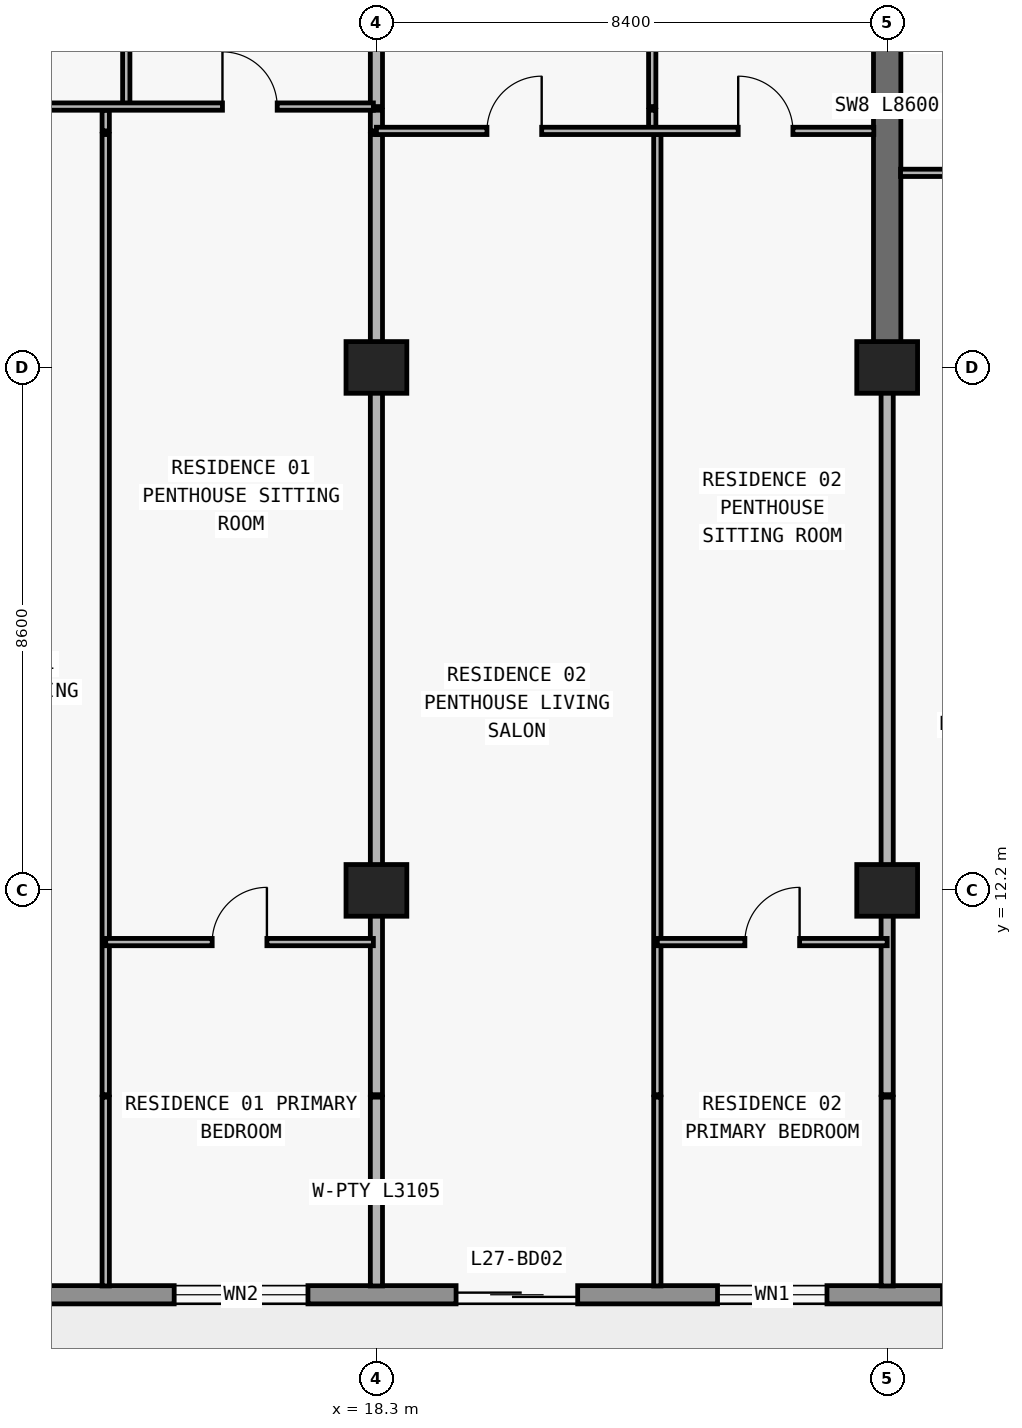
"""IFC4 building model, lengths in metres.
Left out: names, types, materials, properties, quantities, classifications, styles, units other than length and angle.
Written with IfcOpenShell. Run it as: python <this file> out.ifc"""

import sys

from ifc_helpers import new_model, si_unit, direction, frame, frame_2d, origin, origin_2d, place, context, subcontext, project, spatial, rectangle, extrude, element, fill, save


model = new_model("IFC4")
c1 = context("Model", 3, precision=1e-05, world=origin(), true_north=direction((0.0, 1.0)))
c2 = subcontext(c1, "Body", "Model", "MODEL_VIEW")
j1 = project(units=[si_unit("LENGTHUNIT", "METRE"), si_unit("PLANEANGLEUNIT", "RADIAN")], contexts=[c1])
p1 = place(None, origin())
s1 = spatial("IfcSite", under=j1, at=p1, CompositionType="ELEMENT")
p2 = place(p1, origin())
s2 = spatial("IfcBuilding", under=s1, at=p2, CompositionType="ELEMENT")
p3 = place(p2, frame((0.0, 0.0, 102.6)))
s3 = spatial("IfcBuildingStorey", under=s2, at=p3, CompositionType="ELEMENT", Elevation=102.6)
for number, where, z_axis, x_axis in (
    (1, (18.3, 12.2, 0.0), (0.0, 0.0, 1.0), (1.0, 0.0, 0.0)),
    (2, (26.7, 12.2, 0.0), (0.0, 0.0, 1.0), (1.0, 0.0, 0.0)),
    (3, (18.3, 20.8, 0.0), (0.0, 0.0, 1.0), (1.0, 0.0, 0.0)),
    (4, (26.7, 20.8, 0.0), (0.0, 0.0, 1.0), (1.0, 0.0, 0.0)),
):
    element("IfcColumn", number, at=place(p3, frame(where, z_axis=z_axis, x_axis=x_axis)), inside=s3, PredefinedType="COLUMN", context=c2, shape_type="SweptSolid", body=[
        extrude(rectangle(XDim=1.0, YDim=0.85, at=origin_2d()), origin(), (0.0, 0.0, 1.0), 3.05),
    ])
p4 = place(p3, frame((26.7, 20.8, 0.0), z_axis=(0.0, 0.0, 1.0), x_axis=(0.0, 1.0, 0.0)))
e5 = element("IfcWall", 5, at=p4, inside=s3, PredefinedType="SHEAR", context=c2, shape_type="SweptSolid", body=[
    extrude(rectangle(XDim=8.6, YDim=0.45, at=frame_2d((4.3, 0.0))), origin(), (0.0, 0.0, 1.0), 3.05),
])
p5 = place(p3, frame((70.1, 5.55, 0.0), z_axis=(0.0, 0.0, 1.0), x_axis=(-1.0, 0.0, 0.0)))
e6 = element("IfcWall", 6, at=p5, inside=s3, PredefinedType="STANDARD", context=c2, shape_type="SweptSolid", body=[
    extrude(rectangle(XDim=62.4, YDim=0.3, at=frame_2d((31.2, 0.0))), origin(), (0.0, 0.0, 1.0), 3.05),
])
p6 = place(p5, frame((57.226, 0.0, 0.0)))
e7 = element("IfcOpeningElement", 7, at=p6, cuts=e6, PredefinedType="OPENING", context=c2, shape_type="SweptSolid", body=[
    extrude(rectangle(XDim=2.0, YDim=2.3, at=frame_2d((1.0, 1.15))), frame((0.0, 0.16, 0.0), z_axis=(0.0, -1.0, 0.0), x_axis=(1.0, 0.0, 0.0)), (0.0, 0.0, 1.0), 0.32),
])
p7 = place(p5, frame((52.926, 0.0, 0.85)))
e8 = element("IfcOpeningElement", 8, at=p7, cuts=e6, PredefinedType="OPENING", context=c2, shape_type="SweptSolid", body=[
    extrude(rectangle(XDim=2.2, YDim=1.55, at=frame_2d((1.1, 0.775))), frame((0.0, 0.16, 0.0), z_axis=(0.0, -1.0, 0.0), x_axis=(1.0, 0.0, 0.0)), (0.0, 0.0, 1.0), 0.32),
])
p8 = place(p5, frame((48.49, 0.0, 0.0)))
e9 = element("IfcOpeningElement", 9, at=p8, cuts=e6, PredefinedType="OPENING", context=c2, shape_type="SweptSolid", body=[
    extrude(rectangle(XDim=2.0, YDim=2.3, at=frame_2d((1.0, 1.15))), frame((0.0, 0.16, 0.0), z_axis=(0.0, -1.0, 0.0), x_axis=(1.0, 0.0, 0.0)), (0.0, 0.0, 1.0), 0.32),
])
p9 = place(p5, frame((44.39, 0.0, 0.85)))
e10 = element("IfcOpeningElement", 10, at=p9, cuts=e6, PredefinedType="OPENING", context=c2, shape_type="SweptSolid", body=[
    extrude(rectangle(XDim=1.8, YDim=1.55, at=frame_2d((0.9, 0.775))), frame((0.0, 0.16, 0.0), z_axis=(0.0, -1.0, 0.0), x_axis=(1.0, 0.0, 0.0)), (0.0, 0.0, 1.0), 0.32),
])
p10 = place(p5, frame((40.49, 0.0, 0.0)))
e11 = element("IfcOpeningElement", 11, at=p10, cuts=e6, PredefinedType="OPENING", context=c2, shape_type="SweptSolid", body=[
    extrude(rectangle(XDim=2.0, YDim=2.3, at=frame_2d((1.0, 1.15))), frame((0.0, 0.16, 0.0), z_axis=(0.0, -1.0, 0.0), x_axis=(1.0, 0.0, 0.0)), (0.0, 0.0, 1.0), 0.32),
])
p11 = place(p5, frame((35.81, 0.0, 0.65)))
e12 = element("IfcOpeningElement", 12, at=p11, cuts=e6, PredefinedType="OPENING", context=c2, shape_type="SweptSolid", body=[
    extrude(rectangle(XDim=2.6, YDim=1.85, at=frame_2d((1.3, 0.925))), frame((0.0, 0.16, 0.0), z_axis=(0.0, -1.0, 0.0), x_axis=(1.0, 0.0, 0.0)), (0.0, 0.0, 1.0), 0.32),
])
p12 = place(p5, frame((30.1, 0.0, 0.85)))
e13 = element("IfcOpeningElement", 13, at=p12, cuts=e6, PredefinedType="OPENING", context=c2, shape_type="SweptSolid", body=[
    extrude(rectangle(XDim=2.2, YDim=1.55, at=frame_2d((1.1, 0.775))), frame((0.0, 0.16, 0.0), z_axis=(0.0, -1.0, 0.0), x_axis=(1.0, 0.0, 0.0)), (0.0, 0.0, 1.0), 0.32),
])
p13 = place(p5, frame((22.1, 0.0, 0.85)))
e14 = element("IfcOpeningElement", 14, at=p13, cuts=e6, PredefinedType="OPENING", context=c2, shape_type="SweptSolid", body=[
    extrude(rectangle(XDim=2.2, YDim=1.55, at=frame_2d((1.1, 0.775))), frame((0.0, 0.16, 0.0), z_axis=(0.0, -1.0, 0.0), x_axis=(1.0, 0.0, 0.0)), (0.0, 0.0, 1.0), 0.32),
])
p14 = place(p5, frame((15.69, 0.0, 0.0)))
e15 = element("IfcOpeningElement", 15, at=p14, cuts=e6, PredefinedType="OPENING", context=c2, shape_type="SweptSolid", body=[
    extrude(rectangle(XDim=2.0, YDim=2.3, at=frame_2d((1.0, 1.15))), frame((0.0, 0.16, 0.0), z_axis=(0.0, -1.0, 0.0), x_axis=(1.0, 0.0, 0.0)), (0.0, 0.0, 1.0), 0.32),
])
p15 = place(p5, frame((11.59, 0.0, 0.85)))
e16 = element("IfcOpeningElement", 16, at=p15, cuts=e6, PredefinedType="OPENING", context=c2, shape_type="SweptSolid", body=[
    extrude(rectangle(XDim=1.8, YDim=1.55, at=frame_2d((0.9, 0.775))), frame((0.0, 0.16, 0.0), z_axis=(0.0, -1.0, 0.0), x_axis=(1.0, 0.0, 0.0)), (0.0, 0.0, 1.0), 0.32),
])
p16 = place(p5, frame((7.626, 0.0, 0.0)))
e17 = element("IfcOpeningElement", 17, at=p16, cuts=e6, PredefinedType="OPENING", context=c2, shape_type="SweptSolid", body=[
    extrude(rectangle(XDim=2.0, YDim=2.3, at=frame_2d((1.0, 1.15))), frame((0.0, 0.16, 0.0), z_axis=(0.0, -1.0, 0.0), x_axis=(1.0, 0.0, 0.0)), (0.0, 0.0, 1.0), 0.32),
])
p17 = place(p5, frame((3.326, 0.0, 0.85)))
e18 = element("IfcOpeningElement", 18, at=p17, cuts=e6, PredefinedType="OPENING", context=c2, shape_type="SweptSolid", body=[
    extrude(rectangle(XDim=2.2, YDim=1.55, at=frame_2d((1.1, 0.775))), frame((0.0, 0.16, 0.0), z_axis=(0.0, -1.0, 0.0), x_axis=(1.0, 0.0, 0.0)), (0.0, 0.0, 1.0), 0.32),
])
p18 = place(p3, frame((13.848, 5.695, 0.0), z_axis=(0.0, 0.0, 1.0), x_axis=(0.0, 1.0, 0.0)))
e19 = element("IfcWall", 19, at=p18, inside=s3, PredefinedType="PARTITIONING", context=c2, shape_type="SweptSolid", body=[
    extrude(rectangle(XDim=3.105, YDim=0.12, at=frame_2d((1.552, 0.0))), origin(), (0.0, 0.0, 1.0), 3.05),
])
p19 = place(p3, frame((13.848, 8.84, 0.0), z_axis=(0.0, 0.0, 1.0), x_axis=(0.0, 1.0, 0.0)))
e20 = element("IfcWall", 20, at=p19, inside=s3, PredefinedType="PARTITIONING", context=c2, shape_type="SweptSolid", body=[
    extrude(rectangle(XDim=15.79, YDim=0.12, at=frame_2d((7.895, 0.0))), origin(), (0.0, 0.0, 1.0), 3.05),
])
p20 = place(p3, frame((13.848, 24.69, 0.0), z_axis=(0.0, 0.0, 1.0), x_axis=(0.0, 1.0, 0.0)))
e21 = element("IfcWall", 21, at=p20, inside=s3, PredefinedType="PARTITIONING", context=c2, shape_type="SweptSolid", body=[
    extrude(rectangle(XDim=0.34, YDim=0.12, at=frame_2d((0.17, 0.0))), origin(), (0.0, 0.0, 1.0), 3.05),
])
p21 = place(p3, frame((14.186, 25.09, 0.0), z_axis=(0.0, 0.0, 1.0), x_axis=(0.0, 1.0, 0.0)))
e22 = element("IfcWall", 22, at=p21, inside=s3, PredefinedType="PARTITIONING", context=c2, shape_type="SweptSolid", body=[
    extrude(rectangle(XDim=4.69, YDim=0.12, at=frame_2d((2.345, 0.0))), origin(), (0.0, 0.0, 1.0), 3.05),
])
p22 = place(p21, frame((1.895, 0.0, 0.0)))
e23 = element("IfcOpeningElement", 23, at=p22, cuts=e22, PredefinedType="OPENING", context=c2, shape_type="SweptSolid", body=[
    extrude(rectangle(XDim=0.9, YDim=2.15, at=frame_2d((0.45, 1.075))), frame((0.0, 0.07, 0.0), z_axis=(0.0, -1.0, 0.0), x_axis=(1.0, 0.0, 0.0)), (0.0, 0.0, 1.0), 0.14),
])
p23 = place(p3, frame((18.3, 5.695, 0.0), z_axis=(0.0, 0.0, 1.0), x_axis=(0.0, 1.0, 0.0)))
e24 = element("IfcWall", 24, at=p23, inside=s3, PredefinedType="PARTITIONING", context=c2, shape_type="SweptSolid", body=[
    extrude(rectangle(XDim=3.105, YDim=0.2, at=frame_2d((1.552, 0.0))), origin(), (0.0, 0.0, 1.0), 3.05),
])
p24 = place(p3, frame((18.3, 8.84, 0.0), z_axis=(0.0, 0.0, 1.0), x_axis=(0.0, 1.0, 0.0)))
e25 = element("IfcWall", 25, at=p24, inside=s3, PredefinedType="PARTITIONING", context=c2, shape_type="SweptSolid", body=[
    extrude(rectangle(XDim=15.79, YDim=0.2, at=frame_2d((7.895, 0.0))), origin(), (0.0, 0.0, 1.0), 2.174),
])
p25 = place(p3, frame((18.3, 24.69, 0.0), z_axis=(0.0, 0.0, 1.0), x_axis=(0.0, 1.0, 0.0)))
e26 = element("IfcWall", 26, at=p25, inside=s3, PredefinedType="PARTITIONING", context=c2, shape_type="SweptSolid", body=[
    extrude(rectangle(XDim=0.34, YDim=0.2, at=frame_2d((0.17, 0.0))), origin(), (0.0, 0.0, 1.0), 2.174),
])
p26 = place(p3, frame((18.3, 25.09, 0.0), z_axis=(0.0, 0.0, 1.0), x_axis=(0.0, 1.0, 0.0)))
e27 = element("IfcWall", 27, at=p26, inside=s3, PredefinedType="PARTITIONING", context=c2, shape_type="SweptSolid", body=[
    extrude(rectangle(XDim=4.69, YDim=0.2, at=frame_2d((2.345, 0.0))), origin(), (0.0, 0.0, 1.0), 2.174),
])
p27 = place(p3, frame((22.836, 24.69, 0.0), z_axis=(0.0, 0.0, 1.0), x_axis=(0.0, 1.0, 0.0)))
e28 = element("IfcWall", 28, at=p27, inside=s3, PredefinedType="PARTITIONING", context=c2, shape_type="SweptSolid", body=[
    extrude(rectangle(XDim=0.34, YDim=0.12, at=frame_2d((0.17, 0.0))), origin(), (0.0, 0.0, 1.0), 3.05),
])
p28 = place(p3, frame((22.836, 25.09, 0.0), z_axis=(0.0, 0.0, 1.0), x_axis=(0.0, 1.0, 0.0)))
e29 = element("IfcWall", 29, at=p28, inside=s3, PredefinedType="PARTITIONING", context=c2, shape_type="SweptSolid", body=[
    extrude(rectangle(XDim=4.69, YDim=0.12, at=frame_2d((2.345, 0.0))), origin(), (0.0, 0.0, 1.0), 3.05),
])
p29 = place(p28, frame((1.895, 0.0, 0.0)))
e30 = element("IfcOpeningElement", 30, at=p29, cuts=e29, PredefinedType="OPENING", context=c2, shape_type="SweptSolid", body=[
    extrude(rectangle(XDim=0.9, YDim=2.15, at=frame_2d((0.45, 1.075))), frame((0.0, 0.07, 0.0), z_axis=(0.0, -1.0, 0.0), x_axis=(1.0, 0.0, 0.0)), (0.0, 0.0, 1.0), 0.14),
])
p30 = place(p3, frame((22.92, 5.695, 0.0), z_axis=(0.0, 0.0, 1.0), x_axis=(0.0, 1.0, 0.0)))
e31 = element("IfcWall", 31, at=p30, inside=s3, PredefinedType="PARTITIONING", context=c2, shape_type="SweptSolid", body=[
    extrude(rectangle(XDim=3.105, YDim=0.12, at=frame_2d((1.552, 0.0))), origin(), (0.0, 0.0, 1.0), 3.05),
])
p31 = place(p3, frame((22.92, 8.84, 0.0), z_axis=(0.0, 0.0, 1.0), x_axis=(0.0, 1.0, 0.0)))
e32 = element("IfcWall", 32, at=p31, inside=s3, PredefinedType="PARTITIONING", context=c2, shape_type="SweptSolid", body=[
    extrude(rectangle(XDim=15.79, YDim=0.12, at=frame_2d((7.895, 0.0))), origin(), (0.0, 0.0, 1.0), 3.05),
])
p32 = place(p3, frame((26.7, 5.695, 0.0), z_axis=(0.0, 0.0, 1.0), x_axis=(0.0, 1.0, 0.0)))
e33 = element("IfcWall", 33, at=p32, inside=s3, PredefinedType="PARTITIONING", context=c2, shape_type="SweptSolid", body=[
    extrude(rectangle(XDim=3.105, YDim=0.2, at=frame_2d((1.552, 0.0))), origin(), (0.0, 0.0, 1.0), 3.05),
])
p33 = place(p3, frame((26.7, 8.84, 0.0), z_axis=(0.0, 0.0, 1.0), x_axis=(0.0, 1.0, 0.0)))
e34 = element("IfcWall", 34, at=p33, inside=s3, PredefinedType="PARTITIONING", context=c2, shape_type="SweptSolid", body=[
    extrude(rectangle(XDim=11.955, YDim=0.2, at=frame_2d((5.978, 0.0))), origin(), (0.0, 0.0, 1.0), 2.174),
])
p34 = place(p3, frame((13.848, 11.35, 0.0), z_axis=(0.0, 0.0, 1.0), x_axis=(1.0, 0.0, 0.0)))
e35 = element("IfcWall", 35, at=p34, inside=s3, PredefinedType="PARTITIONING", context=c2, shape_type="SweptSolid", body=[
    extrude(rectangle(XDim=4.402, YDim=0.12, at=frame_2d((2.201, 0.0))), origin(), (0.0, 0.0, 1.0), 3.05),
])
p35 = place(p34, frame((1.751, 0.0, 0.0)))
e36 = element("IfcOpeningElement", 36, at=p35, cuts=e35, PredefinedType="OPENING", context=c2, shape_type="SweptSolid", body=[
    extrude(rectangle(XDim=0.9, YDim=2.15, at=frame_2d((0.45, 1.075))), frame((0.0, 0.07, 0.0), z_axis=(0.0, -1.0, 0.0), x_axis=(1.0, 0.0, 0.0)), (0.0, 0.0, 1.0), 0.14),
])
p36 = place(p3, frame((22.92, 11.35, 0.0), z_axis=(0.0, 0.0, 1.0), x_axis=(1.0, 0.0, 0.0)))
e37 = element("IfcWall", 37, at=p36, inside=s3, PredefinedType="PARTITIONING", context=c2, shape_type="SweptSolid", body=[
    extrude(rectangle(XDim=3.78, YDim=0.12, at=frame_2d((1.89, 0.0))), origin(), (0.0, 0.0, 1.0), 3.05),
])
p37 = place(p36, frame((1.44, 0.0, 0.0)))
e38 = element("IfcOpeningElement", 38, at=p37, cuts=e37, PredefinedType="OPENING", context=c2, shape_type="SweptSolid", body=[
    extrude(rectangle(XDim=0.9, YDim=2.15, at=frame_2d((0.45, 1.075))), frame((0.0, 0.07, 0.0), z_axis=(0.0, -1.0, 0.0), x_axis=(1.0, 0.0, 0.0)), (0.0, 0.0, 1.0), 0.14),
])
p38 = place(p3, frame((26.92, 24.0, 0.0), z_axis=(0.0, 0.0, 1.0), x_axis=(1.0, 0.0, 0.0)))
e39 = element("IfcWall", 39, at=p38, inside=s3, PredefinedType="PARTITIONING", context=c2, shape_type="SweptSolid", body=[
    extrude(rectangle(XDim=8.18, YDim=0.12, at=frame_2d((4.09, 0.0))), origin(), (0.0, 0.0, 1.0), 3.05),
])
p39 = place(p38, frame((1.33, 0.0, 0.0)))
e40 = element("IfcOpeningElement", 40, at=p39, cuts=e39, PredefinedType="OPENING", context=c2, shape_type="SweptSolid", body=[
    extrude(rectangle(XDim=0.9, YDim=2.15, at=frame_2d((0.45, 1.075))), frame((0.0, 0.07, 0.0), z_axis=(0.0, -1.0, 0.0), x_axis=(1.0, 0.0, 0.0)), (0.0, 0.0, 1.0), 0.14),
])
p40 = place(p3, frame((18.3, 24.69, 0.0), z_axis=(0.0, 0.0, 1.0), x_axis=(1.0, 0.0, 0.0)))
e41 = element("IfcWall", 41, at=p40, inside=s3, PredefinedType="PARTITIONING", context=c2, shape_type="SweptSolid", body=[
    extrude(rectangle(XDim=8.18, YDim=0.12, at=frame_2d((4.09, 0.0))), origin(), (0.0, 0.0, 1.0), 3.05),
])
p41 = place(p40, frame((1.818, 0.0, 0.0)))
e42 = element("IfcOpeningElement", 42, at=p41, cuts=e41, PredefinedType="OPENING", context=c2, shape_type="SweptSolid", body=[
    extrude(rectangle(XDim=0.9, YDim=2.15, at=frame_2d((0.45, 1.075))), frame((0.0, 0.07, 0.0), z_axis=(0.0, -1.0, 0.0), x_axis=(1.0, 0.0, 0.0)), (0.0, 0.0, 1.0), 0.14),
])
p42 = place(p40, frame((5.95, 0.0, 0.0)))
e43 = element("IfcOpeningElement", 43, at=p42, cuts=e41, PredefinedType="OPENING", context=c2, shape_type="SweptSolid", body=[
    extrude(rectangle(XDim=0.9, YDim=2.15, at=frame_2d((0.45, 1.075))), frame((0.0, 0.07, 0.0), z_axis=(0.0, -1.0, 0.0), x_axis=(1.0, 0.0, 0.0)), (0.0, 0.0, 1.0), 0.14),
])
p43 = place(p3, frame((9.9, 25.09, 0.0), z_axis=(0.0, 0.0, 1.0), x_axis=(1.0, 0.0, 0.0)))
e44 = element("IfcWall", 44, at=p43, inside=s3, PredefinedType="PARTITIONING", context=c2, shape_type="SweptSolid", body=[
    extrude(rectangle(XDim=8.35, YDim=0.12, at=frame_2d((4.175, 0.0))), origin(), (0.0, 0.0, 1.0), 3.05),
])
p44 = place(p43, frame((1.524, 0.0, 0.0)))
e45 = element("IfcOpeningElement", 45, at=p44, cuts=e44, PredefinedType="OPENING", context=c2, shape_type="SweptSolid", body=[
    extrude(rectangle(XDim=0.9, YDim=2.15, at=frame_2d((0.45, 1.075))), frame((0.0, 0.07, 0.0), z_axis=(0.0, -1.0, 0.0), x_axis=(1.0, 0.0, 0.0)), (0.0, 0.0, 1.0), 0.14),
])
p45 = place(p43, frame((5.868, 0.0, 0.0)))
e46 = element("IfcOpeningElement", 46, at=p45, cuts=e44, PredefinedType="OPENING", context=c2, shape_type="SweptSolid", body=[
    extrude(rectangle(XDim=0.9, YDim=2.15, at=frame_2d((0.45, 1.075))), frame((0.0, 0.07, 0.0), z_axis=(0.0, -1.0, 0.0), x_axis=(1.0, 0.0, 0.0)), (0.0, 0.0, 1.0), 0.14),
])
p46 = place(p7, origin())
e47 = element("IfcWindow", 47, at=p46, inside=s3, PartitioningType="SINGLE_PANEL", PredefinedType="WINDOW", context=c2, shape_type="SweptSolid", body=[
    extrude(rectangle(XDim=2.2, YDim=1.55, at=frame_2d((1.1, 0.775))), frame((0.0, 0.03, 0.0), z_axis=(0.0, -1.0, 0.0), x_axis=(1.0, 0.0, 0.0)), (0.0, 0.0, 1.0), 0.06),
])
fill(e8, e47)
p47 = place(p8, origin())
e48 = element("IfcDoor", 48, at=p47, inside=s3, OperationType="DOUBLE_DOOR_SLIDING", PredefinedType="DOOR", context=c2, shape_type="SweptSolid", body=[
    extrude(rectangle(XDim=2.0, YDim=2.3, at=frame_2d((1.0, 1.15))), frame((0.0, 0.025, 0.0), z_axis=(0.0, -1.0, 0.0), x_axis=(1.0, 0.0, 0.0)), (0.0, 0.0, 1.0), 0.05),
])
fill(e9, e48)
p48 = place(p9, origin())
e49 = element("IfcWindow", 49, at=p48, inside=s3, PartitioningType="SINGLE_PANEL", PredefinedType="WINDOW", context=c2, shape_type="SweptSolid", body=[
    extrude(rectangle(XDim=1.8, YDim=1.55, at=frame_2d((0.9, 0.775))), frame((0.0, 0.03, 0.0), z_axis=(0.0, -1.0, 0.0), x_axis=(1.0, 0.0, 0.0)), (0.0, 0.0, 1.0), 0.06),
])
fill(e10, e49)
p49 = place(p45, origin())
e50 = element("IfcDoor", 50, at=p49, inside=s3, OperationType="SINGLE_SWING_LEFT", PredefinedType="DOOR", context=c2, shape_type="SweptSolid", body=[
    extrude(rectangle(XDim=0.9, YDim=2.15, at=frame_2d((0.45, 1.075))), frame((0.0, 0.025, 0.0), z_axis=(0.0, -1.0, 0.0), x_axis=(1.0, 0.0, 0.0)), (0.0, 0.0, 1.0), 0.05),
])
fill(e46, e50)
p50 = place(p35, origin())
e51 = element("IfcDoor", 51, at=p50, inside=s3, OperationType="SINGLE_SWING_RIGHT", PredefinedType="DOOR", context=c2, shape_type="SweptSolid", body=[
    extrude(rectangle(XDim=0.9, YDim=2.15, at=frame_2d((0.45, 1.075))), frame((0.0, 0.025, 0.0), z_axis=(0.0, -1.0, 0.0), x_axis=(1.0, 0.0, 0.0)), (0.0, 0.0, 1.0), 0.05),
])
fill(e36, e51)
p51 = place(p41, origin())
e52 = element("IfcDoor", 52, at=p51, inside=s3, OperationType="SINGLE_SWING_RIGHT", PredefinedType="DOOR", context=c2, shape_type="SweptSolid", body=[
    extrude(rectangle(XDim=0.9, YDim=2.15, at=frame_2d((0.45, 1.075))), frame((0.0, 0.025, 0.0), z_axis=(0.0, -1.0, 0.0), x_axis=(1.0, 0.0, 0.0)), (0.0, 0.0, 1.0), 0.05),
])
fill(e42, e52)
p52 = place(p42, origin())
e53 = element("IfcDoor", 53, at=p52, inside=s3, OperationType="SINGLE_SWING_LEFT", PredefinedType="DOOR", context=c2, shape_type="SweptSolid", body=[
    extrude(rectangle(XDim=0.9, YDim=2.15, at=frame_2d((0.45, 1.075))), frame((0.0, 0.025, 0.0), z_axis=(0.0, -1.0, 0.0), x_axis=(1.0, 0.0, 0.0)), (0.0, 0.0, 1.0), 0.05),
])
fill(e43, e53)
p53 = place(p37, origin())
e54 = element("IfcDoor", 54, at=p53, inside=s3, OperationType="SINGLE_SWING_RIGHT", PredefinedType="DOOR", context=c2, shape_type="SweptSolid", body=[
    extrude(rectangle(XDim=0.9, YDim=2.15, at=frame_2d((0.45, 1.075))), frame((0.0, 0.025, 0.0), z_axis=(0.0, -1.0, 0.0), x_axis=(1.0, 0.0, 0.0)), (0.0, 0.0, 1.0), 0.05),
])
fill(e38, e54)
save(model, sys.argv[1])
